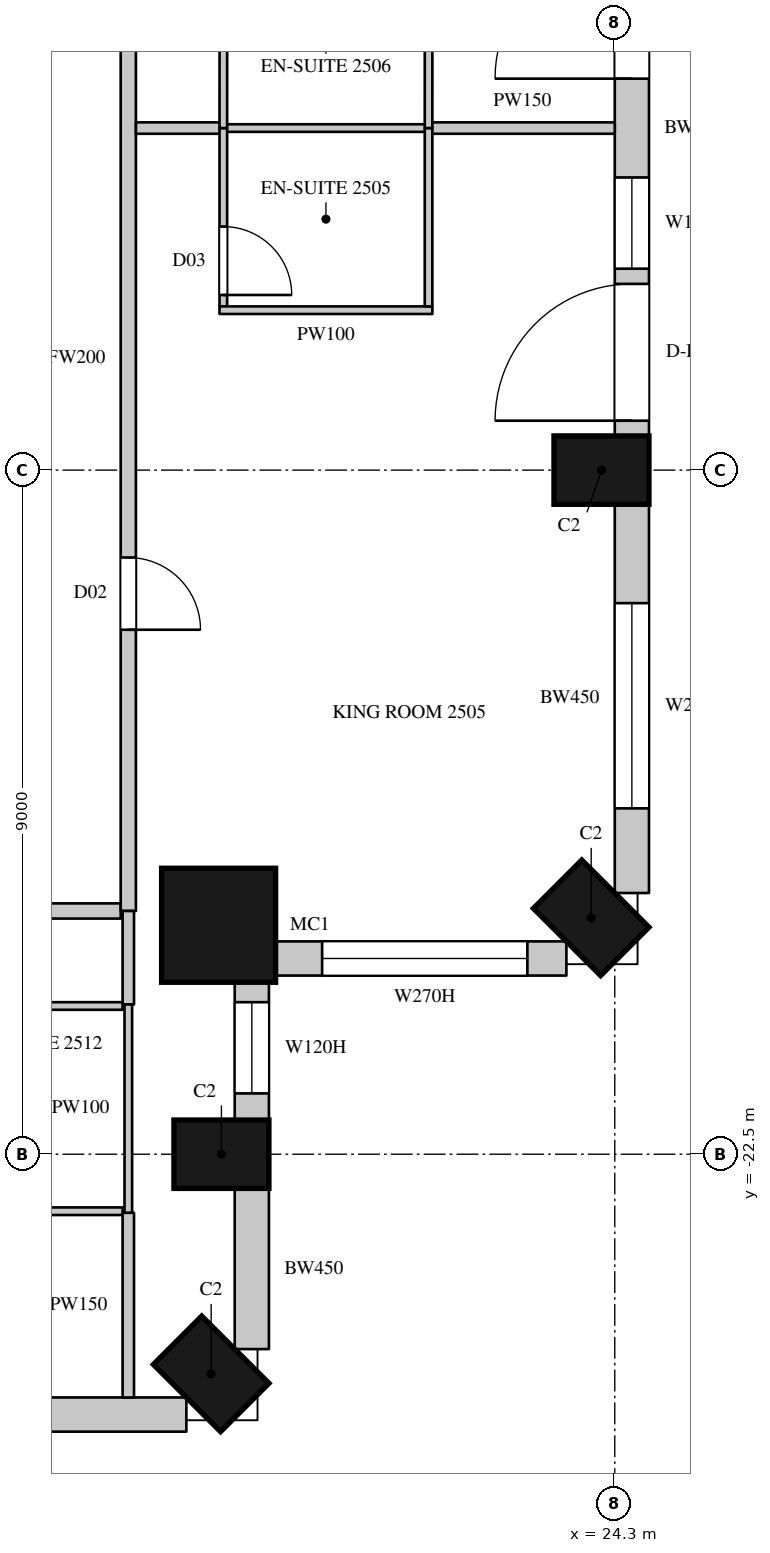
"""IFC4 building model, lengths in metres.
Left out: names, types, materials, properties, quantities, classifications, styles, units other than length and angle.
Written with IfcOpenShell. Run it as: python <this file> out.ifc"""

import sys

from ifc_helpers import new_model, si_unit, direction, frame, frame_2d, origin, origin_2d, place, context, subcontext, project, spatial, rectangle, circle, extrude, element, fill, save


model = new_model("IFC4")
c1 = context("Model", 3, precision=1e-05, world=origin(), true_north=direction((0.0, 1.0)))
c2 = subcontext(c1, "Body", "Model", "MODEL_VIEW")
j1 = project(units=[si_unit("LENGTHUNIT", "METRE"), si_unit("PLANEANGLEUNIT", "RADIAN")], contexts=[c1])
p1 = place(None, origin())
s1 = spatial("IfcSite", under=j1, at=p1, CompositionType="ELEMENT")
p2 = place(p1, origin())
s2 = spatial("IfcBuilding", under=s1, at=p2, CompositionType="ELEMENT")
p3 = place(p2, frame((0.0, 0.0, 120.3)))
s3 = spatial("IfcBuildingStorey", under=s2, at=p3, CompositionType="ELEMENT", Elevation=120.3)
for number, where, z_axis, x_axis in (
    (1, (18.99, -25.39, 0.0), (0.0, 0.0, 1.0), (0.707, 0.707, 0.0)),
    (2, (19.125, -22.5, 0.0), (0.0, 0.0, 1.0), (0.0, 1.0, 0.0)),
):
    element("IfcColumn", number, at=place(p3, frame(where, z_axis=z_axis, x_axis=x_axis)), inside=s3, PredefinedType="COLUMN", context=c2, shape_type="SweptSolid", body=[
        extrude(rectangle(XDim=0.9, YDim=1.25, at=origin_2d()), origin(), (0.0, 0.0, 1.0), 3.6),
    ])
p4 = place(p3, frame((19.088, -19.488, 0.0), z_axis=(0.0, 0.0, 1.0), x_axis=(1.0, 0.0, 0.0)))
e3 = element("IfcColumn", 3, at=p4, inside=s3, PredefinedType="COLUMN", context=c2, shape_type="SweptSolid", body=[
    extrude(circle(Radius=0.75, at=origin_2d()), origin(), (0.0, 0.0, 1.0), 3.6),
])
for number, where, z_axis, x_axis in (
    (4, (23.99, -19.39, 0.0), (0.0, 0.0, 1.0), (0.707, 0.707, 0.0)),
    (5, (24.125, -13.5, 0.0), (0.0, 0.0, 1.0), (0.0, 1.0, 0.0)),
):
    element("IfcColumn", number, at=place(p3, frame(where, z_axis=z_axis, x_axis=x_axis)), inside=s3, PredefinedType="COLUMN", context=c2, shape_type="SweptSolid", body=[
        extrude(rectangle(XDim=0.9, YDim=1.25, at=origin_2d()), origin(), (0.0, 0.0, 1.0), 3.6),
    ])
p5 = place(p3, frame((15.75, -25.925, 0.0), z_axis=(0.0, 0.0, 1.0), x_axis=(1.0, 0.0, 0.0)))
e6 = element("IfcWall", 6, at=p5, inside=s3, PredefinedType="SOLIDWALL", context=c2, shape_type="SweptSolid", body=[
    extrude(rectangle(XDim=2.914, YDim=0.45, at=frame_2d((1.457, 0.0))), origin(), (0.0, 0.0, 1.0), 3.3),
])
p6 = place(p3, frame((19.525, -25.064, 0.0), z_axis=(0.0, 0.0, 1.0), x_axis=(0.0, 1.0, 0.0)))
e7 = element("IfcWall", 7, at=p6, inside=s3, PredefinedType="SOLIDWALL", context=c2, shape_type="SweptSolid", body=[
    extrude(rectangle(XDim=2.114, YDim=0.45, at=frame_2d((1.057, 0.0))), origin(), (0.0, 0.0, 1.0), 3.3),
])
p7 = place(p3, frame((19.525, -22.05, 0.0), z_axis=(0.0, 0.0, 1.0), x_axis=(0.0, 1.0, 0.0)))
e8 = element("IfcWall", 8, at=p7, inside=s3, PredefinedType="SOLIDWALL", context=c2, shape_type="SweptSolid", body=[
    extrude(rectangle(XDim=1.843, YDim=0.45, at=frame_2d((0.921, 0.0))), origin(), (0.0, 0.0, 1.0), 3.3),
])
p8 = place(p7, frame((0.35, 0.0, 1.05)))
e9 = element("IfcOpeningElement", 9, at=p8, cuts=e8, PredefinedType="OPENING", context=c2, shape_type="SweptSolid", body=[
    extrude(rectangle(XDim=1.2, YDim=2.0, at=frame_2d((0.6, 1.0))), frame((0.0, 0.235, 0.0), z_axis=(0.0, -1.0, 0.0), x_axis=(1.0, 0.0, 0.0)), (0.0, 0.0, 1.0), 0.47),
])
p9 = place(p3, frame((19.807, -19.925, 0.0), z_axis=(0.0, 0.0, 1.0), x_axis=(1.0, 0.0, 0.0)))
e10 = element("IfcWall", 10, at=p9, inside=s3, PredefinedType="SOLIDWALL", context=c2, shape_type="SweptSolid", body=[
    extrude(rectangle(XDim=3.857, YDim=0.45, at=frame_2d((1.928, 0.0))), origin(), (0.0, 0.0, 1.0), 3.3),
])
p10 = place(p9, frame((0.643, 0.0, 1.05)))
e11 = element("IfcOpeningElement", 11, at=p10, cuts=e10, PredefinedType="OPENING", context=c2, shape_type="SweptSolid", body=[
    extrude(rectangle(XDim=2.7, YDim=2.0, at=frame_2d((1.35, 1.0))), frame((0.0, 0.235, 0.0), z_axis=(0.0, -1.0, 0.0), x_axis=(1.0, 0.0, 0.0)), (0.0, 0.0, 1.0), 0.47),
])
p11 = place(p3, frame((24.525, -19.064, 0.0), z_axis=(0.0, 0.0, 1.0), x_axis=(0.0, 1.0, 0.0)))
e12 = element("IfcWall", 12, at=p11, inside=s3, PredefinedType="SOLIDWALL", context=c2, shape_type="SweptSolid", body=[
    extrude(rectangle(XDim=5.114, YDim=0.45, at=frame_2d((2.557, 0.0))), origin(), (0.0, 0.0, 1.0), 3.3),
])
p12 = place(p11, frame((1.114, 0.0, 1.05)))
e13 = element("IfcOpeningElement", 13, at=p12, cuts=e12, PredefinedType="OPENING", context=c2, shape_type="SweptSolid", body=[
    extrude(rectangle(XDim=2.7, YDim=2.0, at=frame_2d((1.35, 1.0))), frame((0.0, 0.235, 0.0), z_axis=(0.0, -1.0, 0.0), x_axis=(1.0, 0.0, 0.0)), (0.0, 0.0, 1.0), 0.47),
])
p13 = place(p3, frame((24.525, -13.05, 0.0), z_axis=(0.0, 0.0, 1.0), x_axis=(0.0, 1.0, 0.0)))
e14 = element("IfcWall", 14, at=p13, inside=s3, PredefinedType="SOLIDWALL", context=c2, shape_type="SweptSolid", body=[
    extrude(rectangle(XDim=8.1, YDim=0.45, at=frame_2d((4.05, 0.0))), origin(), (0.0, 0.0, 1.0), 3.3),
])
p14 = place(p13, frame((0.2, 0.0, 0.0)))
e15 = element("IfcOpeningElement", 15, at=p14, cuts=e14, PredefinedType="OPENING", context=c2, shape_type="SweptSolid", body=[
    extrude(rectangle(XDim=1.8, YDim=2.4, at=frame_2d((0.9, 1.2))), frame((0.0, 0.235, 0.0), z_axis=(0.0, -1.0, 0.0), x_axis=(1.0, 0.0, 0.0)), (0.0, 0.0, 1.0), 0.47),
])
p15 = place(p13, frame((2.2, 0.0, 1.05)))
e16 = element("IfcOpeningElement", 16, at=p15, cuts=e14, PredefinedType="OPENING", context=c2, shape_type="SweptSolid", body=[
    extrude(rectangle(XDim=1.2, YDim=2.0, at=frame_2d((0.6, 1.0))), frame((0.0, 0.235, 0.0), z_axis=(0.0, -1.0, 0.0), x_axis=(1.0, 0.0, 0.0)), (0.0, 0.0, 1.0), 0.47),
])
p16 = place(p13, frame((4.7, 0.0, 0.0)))
e17 = element("IfcOpeningElement", 17, at=p16, cuts=e14, PredefinedType="OPENING", context=c2, shape_type="SweptSolid", body=[
    extrude(rectangle(XDim=1.8, YDim=2.4, at=frame_2d((0.9, 1.2))), frame((0.0, 0.235, 0.0), z_axis=(0.0, -1.0, 0.0), x_axis=(1.0, 0.0, 0.0)), (0.0, 0.0, 1.0), 0.47),
])
p17 = place(p13, frame((6.7, 0.0, 1.05)))
e18 = element("IfcOpeningElement", 18, at=p17, cuts=e14, PredefinedType="OPENING", context=c2, shape_type="SweptSolid", body=[
    extrude(rectangle(XDim=1.2, YDim=2.0, at=frame_2d((0.6, 1.0))), frame((0.0, 0.235, 0.0), z_axis=(0.0, -1.0, 0.0), x_axis=(1.0, 0.0, 0.0)), (0.0, 0.0, 1.0), 0.47),
])
p18 = place(p3, frame((-20.8, -19.3, 0.0), z_axis=(0.0, 0.0, 1.0), x_axis=(1.0, 0.0, 0.0)))
e19 = element("IfcWall", 19, at=p18, inside=s3, PredefinedType="PARTITIONING", context=c2, shape_type="SweptSolid", body=[
    extrude(rectangle(XDim=38.6, YDim=0.2, at=frame_2d((19.3, 0.0))), origin(), (0.0, 0.0, 1.0), 3.3),
])
p19 = place(p18, frame((11.2, 0.0, 0.0)))
e20 = element("IfcOpeningElement", 20, at=p19, cuts=e19, PredefinedType="OPENING", context=c2, shape_type="SweptSolid", body=[
    extrude(rectangle(XDim=0.95, YDim=2.2, at=frame_2d((0.475, 1.1))), frame((0.0, 0.11, 0.0), z_axis=(0.0, -1.0, 0.0), x_axis=(1.0, 0.0, 0.0)), (0.0, 0.0, 1.0), 0.22),
])
p20 = place(p18, frame((15.05, 0.0, 0.0)))
e21 = element("IfcOpeningElement", 21, at=p20, cuts=e19, PredefinedType="OPENING", context=c2, shape_type="SweptSolid", body=[
    extrude(rectangle(XDim=0.95, YDim=2.2, at=frame_2d((0.475, 1.1))), frame((0.0, 0.11, 0.0), z_axis=(0.0, -1.0, 0.0), x_axis=(1.0, 0.0, 0.0)), (0.0, 0.0, 1.0), 0.22),
])
p21 = place(p18, frame((29.2, 0.0, 0.0)))
e22 = element("IfcOpeningElement", 22, at=p21, cuts=e19, PredefinedType="OPENING", context=c2, shape_type="SweptSolid", body=[
    extrude(rectangle(XDim=0.95, YDim=2.2, at=frame_2d((0.475, 1.1))), frame((0.0, 0.11, 0.0), z_axis=(0.0, -1.0, 0.0), x_axis=(1.0, 0.0, 0.0)), (0.0, 0.0, 1.0), 0.22),
])
p22 = place(p18, frame((33.05, 0.0, 0.0)))
e23 = element("IfcOpeningElement", 23, at=p22, cuts=e19, PredefinedType="OPENING", context=c2, shape_type="SweptSolid", body=[
    extrude(rectangle(XDim=0.95, YDim=2.2, at=frame_2d((0.475, 1.1))), frame((0.0, 0.11, 0.0), z_axis=(0.0, -1.0, 0.0), x_axis=(1.0, 0.0, 0.0)), (0.0, 0.0, 1.0), 0.22),
])
p23 = place(p3, frame((17.9, -19.3, 0.0), z_axis=(0.0, 0.0, 1.0), x_axis=(0.0, 1.0, 0.0)))
e24 = element("IfcWall", 24, at=p23, inside=s3, PredefinedType="PARTITIONING", context=c2, shape_type="SweptSolid", body=[
    extrude(rectangle(XDim=14.55, YDim=0.2, at=frame_2d((7.275, 0.0))), origin(), (0.0, 0.0, 1.0), 3.3),
])
p24 = place(p23, frame((3.7, 0.0, 0.0)))
e25 = element("IfcOpeningElement", 25, at=p24, cuts=e24, PredefinedType="OPENING", context=c2, shape_type="SweptSolid", body=[
    extrude(rectangle(XDim=0.95, YDim=2.2, at=frame_2d((0.475, 1.1))), frame((0.0, 0.11, 0.0), z_axis=(0.0, -1.0, 0.0), x_axis=(1.0, 0.0, 0.0)), (0.0, 0.0, 1.0), 0.22),
])
p25 = place(p23, frame((13.2, 0.0, 0.0)))
e26 = element("IfcOpeningElement", 26, at=p25, cuts=e24, PredefinedType="OPENING", context=c2, shape_type="SweptSolid", body=[
    extrude(rectangle(XDim=0.95, YDim=2.2, at=frame_2d((0.475, 1.1))), frame((0.0, 0.11, 0.0), z_axis=(0.0, -1.0, 0.0), x_axis=(1.0, 0.0, 0.0)), (0.0, 0.0, 1.0), 0.22),
])
p26 = place(p3, frame((17.9, -25.7, 0.0), z_axis=(0.0, 0.0, 1.0), x_axis=(0.0, 1.0, 0.0)))
e27 = element("IfcWall", 27, at=p26, inside=s3, PredefinedType="PARTITIONING", context=c2, shape_type="SweptSolid", body=[
    extrude(rectangle(XDim=2.43, YDim=0.15, at=frame_2d((1.215, 0.0))), origin(), (0.0, 0.0, 1.0), 3.3),
])
p27 = place(p3, frame((17.9, -20.53, 0.0), z_axis=(0.0, 0.0, 1.0), x_axis=(0.0, 1.0, 0.0)))
e28 = element("IfcWall", 28, at=p27, inside=s3, PredefinedType="PARTITIONING", context=c2, shape_type="SweptSolid", body=[
    extrude(rectangle(XDim=1.23, YDim=0.15, at=frame_2d((0.615, 0.0))), origin(), (0.0, 0.0, 1.0), 3.3),
])
p28 = place(p3, frame((18.0, -9.0, 0.0), z_axis=(0.0, 0.0, 1.0), x_axis=(1.0, 0.0, 0.0)))
e29 = element("IfcWall", 29, at=p28, inside=s3, PredefinedType="PARTITIONING", context=c2, shape_type="SweptSolid", body=[
    extrude(rectangle(XDim=1.13, YDim=0.15, at=frame_2d((0.565, 0.0))), origin(), (0.0, 0.0, 1.0), 2.65),
])
p29 = place(p3, frame((21.87, -9.0, 0.0), z_axis=(0.0, 0.0, 1.0), x_axis=(1.0, 0.0, 0.0)))
e30 = element("IfcWall", 30, at=p29, inside=s3, PredefinedType="PARTITIONING", context=c2, shape_type="SweptSolid", body=[
    extrude(rectangle(XDim=2.43, YDim=0.15, at=frame_2d((1.215, 0.0))), origin(), (0.0, 0.0, 1.0), 2.65),
])
for number, where, z_axis, x_axis in (
    (31, (15.45, -23.25, 0.0), (0.0, 0.0, 1.0), (1.0, 0.0, 0.0)),
    (32, (15.45, -20.55, 0.0), (0.0, 0.0, 1.0), (1.0, 0.0, 0.0)),
):
    element("IfcWall", number, at=place(p3, frame(where, z_axis=z_axis, x_axis=x_axis)), inside=s3, PredefinedType="PARTITIONING", context=c2, shape_type="SweptSolid", body=[
        extrude(rectangle(XDim=2.375, YDim=0.1, at=frame_2d((1.188, 0.0))), origin(), (0.0, 0.0, 1.0), 3.3),
    ])
p30 = place(p3, frame((17.9, -23.27, 0.0), z_axis=(0.0, 0.0, 1.0), x_axis=(0.0, 1.0, 0.0)))
e33 = element("IfcWall", 33, at=p30, inside=s3, PredefinedType="PARTITIONING", context=c2, shape_type="SweptSolid", body=[
    extrude(rectangle(XDim=2.74, YDim=0.1, at=frame_2d((1.37, 0.0))), origin(), (0.0, 0.0, 1.0), 3.3),
])
p31 = place(p3, frame((19.13, -9.0, 0.0), z_axis=(0.0, 0.0, 1.0), x_axis=(1.0, 0.0, 0.0)))
e34 = element("IfcWall", 34, at=p31, inside=s3, PredefinedType="PARTITIONING", context=c2, shape_type="SweptSolid", body=[
    extrude(rectangle(XDim=2.74, YDim=0.1, at=frame_2d((1.37, 0.0))), origin(), (0.0, 0.0, 1.0), 2.65),
])
p32 = place(p3, frame((19.15, -11.346, 0.0), z_axis=(0.0, 0.0, 1.0), x_axis=(0.0, 1.0, 0.0)))
e35 = element("IfcWall", 35, at=p32, inside=s3, PredefinedType="PARTITIONING", context=c2, shape_type="SweptSolid", body=[
    extrude(rectangle(XDim=2.346, YDim=0.1, at=frame_2d((1.173, 0.0))), origin(), (0.0, 0.0, 1.0), 3.3),
])
p33 = place(p32, frame((0.15, 0.0, 0.0)))
e36 = element("IfcOpeningElement", 36, at=p33, cuts=e35, PredefinedType="OPENING", context=c2, shape_type="SweptSolid", body=[
    extrude(rectangle(XDim=0.9, YDim=2.2, at=frame_2d((0.45, 1.1))), frame((0.0, 0.06, 0.0), z_axis=(0.0, -1.0, 0.0), x_axis=(1.0, 0.0, 0.0)), (0.0, 0.0, 1.0), 0.12),
])
p34 = place(p3, frame((19.1, -11.396, 0.0), z_axis=(0.0, 0.0, 1.0), x_axis=(1.0, 0.0, 0.0)))
e37 = element("IfcWall", 37, at=p34, inside=s3, PredefinedType="PARTITIONING", context=c2, shape_type="SweptSolid", body=[
    extrude(rectangle(XDim=2.8, YDim=0.1, at=frame_2d((1.4, 0.0))), origin(), (0.0, 0.0, 1.0), 3.3),
])
p35 = place(p3, frame((19.15, -9.0, 0.0), z_axis=(0.0, 0.0, 1.0), x_axis=(0.000499051739, 0.999999875474, 0.0)))
e38 = element("IfcWall", 38, at=p35, inside=s3, PredefinedType="PARTITIONING", context=c2, shape_type="SweptSolid", body=[
    extrude(rectangle(XDim=2.446, YDim=0.1, at=frame_2d((1.223, 0.0))), origin(), (0.0, 0.0, 1.0), 3.3),
])
p36 = place(p35, frame((1.3, 0.0, 0.0)))
e39 = element("IfcOpeningElement", 39, at=p36, cuts=e38, PredefinedType="OPENING", context=c2, shape_type="SweptSolid", body=[
    extrude(rectangle(XDim=0.9, YDim=2.2, at=frame_2d((0.45, 1.1))), frame((0.0, 0.06, 0.0), z_axis=(0.0, -1.0, 0.0), x_axis=(1.0, 0.0, 0.0)), (0.0, 0.0, 1.0), 0.12),
])
p37 = place(p3, frame((21.85, -11.346, 0.0), z_axis=(0.0, 0.0, 1.0), x_axis=(0.0, 1.0, 0.0)))
e40 = element("IfcWall", 40, at=p37, inside=s3, PredefinedType="PARTITIONING", context=c2, shape_type="SweptSolid", body=[
    extrude(rectangle(XDim=2.346, YDim=0.1, at=frame_2d((1.173, 0.0))), origin(), (0.0, 0.0, 1.0), 3.3),
])
p38 = place(p3, frame((21.85, -9.0, 0.0), z_axis=(0.0, 0.0, 1.0), x_axis=(0.00041644973, 0.999999913285, 0.0)))
e41 = element("IfcWall", 41, at=p38, inside=s3, PredefinedType="PARTITIONING", context=c2, shape_type="SweptSolid", body=[
    extrude(rectangle(XDim=2.345, YDim=0.1, at=frame_2d((1.172, 0.0))), origin(), (0.0, 0.0, 1.0), 3.3),
])
p39 = place(p8, origin())
e42 = element("IfcWindow", 42, at=p39, inside=s3, PartitioningType="SINGLE_PANEL", PredefinedType="WINDOW", context=c2, shape_type="SweptSolid", body=[
    extrude(rectangle(XDim=1.2, YDim=2.0, at=frame_2d((0.6, 1.0))), frame((0.0, 0.135, 0.0), z_axis=(0.0, -1.0, 0.0), x_axis=(1.0, 0.0, 0.0)), (0.0, 0.0, 1.0), 0.06),
])
fill(e9, e42)
p40 = place(p10, origin())
e43 = element("IfcWindow", 43, at=p40, inside=s3, PartitioningType="SINGLE_PANEL", PredefinedType="WINDOW", context=c2, shape_type="SweptSolid", body=[
    extrude(rectangle(XDim=2.7, YDim=2.0, at=frame_2d((1.35, 1.0))), frame((0.0, 0.135, 0.0), z_axis=(0.0, -1.0, 0.0), x_axis=(1.0, 0.0, 0.0)), (0.0, 0.0, 1.0), 0.06),
])
fill(e11, e43)
p41 = place(p12, origin())
e44 = element("IfcWindow", 44, at=p41, inside=s3, PartitioningType="SINGLE_PANEL", PredefinedType="WINDOW", context=c2, shape_type="SweptSolid", body=[
    extrude(rectangle(XDim=2.7, YDim=2.0, at=frame_2d((1.35, 1.0))), frame((0.0, 0.135, 0.0), z_axis=(0.0, -1.0, 0.0), x_axis=(1.0, 0.0, 0.0)), (0.0, 0.0, 1.0), 0.06),
])
fill(e13, e44)
p42 = place(p14, origin())
e45 = element("IfcDoor", 45, at=p42, inside=s3, OperationType="SLIDING_TO_LEFT", PredefinedType="DOOR", context=c2, shape_type="SweptSolid", body=[
    extrude(rectangle(XDim=1.8, YDim=2.4, at=frame_2d((0.9, 1.2))), frame((0.0, 0.13, 0.0), z_axis=(0.0, -1.0, 0.0), x_axis=(1.0, 0.0, 0.0)), (0.0, 0.0, 1.0), 0.05),
])
fill(e15, e45)
p43 = place(p15, origin())
e46 = element("IfcWindow", 46, at=p43, inside=s3, PartitioningType="SINGLE_PANEL", PredefinedType="WINDOW", context=c2, shape_type="SweptSolid", body=[
    extrude(rectangle(XDim=1.2, YDim=2.0, at=frame_2d((0.6, 1.0))), frame((0.0, 0.135, 0.0), z_axis=(0.0, -1.0, 0.0), x_axis=(1.0, 0.0, 0.0)), (0.0, 0.0, 1.0), 0.06),
])
fill(e16, e46)
p44 = place(p16, origin())
e47 = element("IfcDoor", 47, at=p44, inside=s3, OperationType="SLIDING_TO_LEFT", PredefinedType="DOOR", context=c2, shape_type="SweptSolid", body=[
    extrude(rectangle(XDim=1.8, YDim=2.4, at=frame_2d((0.9, 1.2))), frame((0.0, 0.13, 0.0), z_axis=(0.0, -1.0, 0.0), x_axis=(1.0, 0.0, 0.0)), (0.0, 0.0, 1.0), 0.05),
])
fill(e17, e47)
p45 = place(p24, origin())
e48 = element("IfcDoor", 48, at=p45, inside=s3, OperationType="SINGLE_SWING_RIGHT", PredefinedType="DOOR", context=c2, shape_type="SweptSolid", body=[
    extrude(rectangle(XDim=0.95, YDim=2.2, at=frame_2d((0.475, 1.1))), frame((0.0, 0.025, 0.0), z_axis=(0.0, -1.0, 0.0), x_axis=(1.0, 0.0, 0.0)), (0.0, 0.0, 1.0), 0.05),
])
fill(e25, e48)
p46 = place(p33, origin())
e49 = element("IfcDoor", 49, at=p46, inside=s3, OperationType="SINGLE_SWING_RIGHT", PredefinedType="DOOR", context=c2, shape_type="SweptSolid", body=[
    extrude(rectangle(XDim=0.9, YDim=2.2, at=frame_2d((0.45, 1.1))), frame((0.0, 0.025, 0.0), z_axis=(0.0, -1.0, 0.0), x_axis=(1.0, 0.0, 0.0)), (0.0, 0.0, 1.0), 0.05),
])
fill(e36, e49)
save(model, sys.argv[1])
